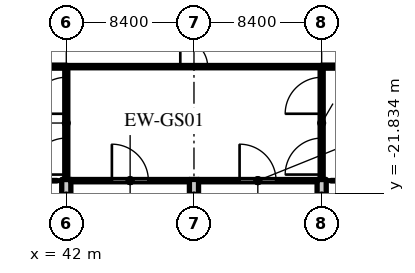
"""IFC4 building model, lengths in metres.
Left out: names, types, materials, properties, quantities, classifications, styles, units other than length and angle.
Written with IfcOpenShell. Run it as: python <this file> out.ifc"""

import sys

from ifc_helpers import new_model, si_unit, direction, frame, frame_2d, origin, place, context, subcontext, project, spatial, rectangle, extrude, source, transform, mapped, element, fill, save


model = new_model("IFC4")
c1 = context("Model", 3, precision=1e-05, world=origin(), true_north=direction((0.0, 1.0)))
c2 = subcontext(c1, "Body", "Model", "MODEL_VIEW")
j1 = project(units=[si_unit("LENGTHUNIT", "METRE"), si_unit("PLANEANGLEUNIT", "RADIAN")], contexts=[c1])
p1 = place(None, origin())
s1 = spatial("IfcSite", under=j1, at=p1, CompositionType="ELEMENT")
p2 = place(p1, origin())
s2 = spatial("IfcBuilding", under=s1, at=p2, CompositionType="ELEMENT")
p3 = place(p2, origin())
s3 = spatial("IfcBuildingStorey", under=s2, at=p3, CompositionType="ELEMENT", Elevation=0.0)
m1 = source(origin(), c2, "Body", "SweptSolid", [
    extrude(rectangle(XDim=2.18, YDim=0.6, at=frame_2d((1.09, 0.0))), origin(), (0.0, 0.0, 1.0), 4.05),
])
for number, where, z_axis, x_axis in (
    (1, (42.0, -23.1, 0.0), (0.0, 0.0, 1.0), (0.0, 1.0, 0.0)),
    (2, (50.4, -23.1, 0.0), (0.0, 0.0, 1.0), (0.0, 1.0, 0.0)),
    (3, (58.8, -23.1, 0.0), (0.0, 0.0, 1.0), (0.0, 1.0, 0.0)),
):
    element("IfcWall", number, at=place(p3, frame(where, z_axis=z_axis, x_axis=x_axis)), inside=s3, PredefinedType="SOLIDWALL", context=c2, shape_type="MappedRepresentation", body=[
        mapped(m1, transform((0.0, 0.0, 0.0), scale=1.0)),
    ])
m2 = source(origin(), c2, "Body", "SweptSolid", [
    extrude(rectangle(XDim=7.8, YDim=0.15, at=frame_2d((3.9, 0.0))), origin(), (0.0, 0.0, 1.0), 4.05),
])
p4 = place(p3, frame((42.3, -21.0, 0.0), z_axis=(0.0, 0.0, 1.0), x_axis=(1.0, 0.0, 0.0)))
e4 = element("IfcWall", 4, at=p4, inside=s3, PredefinedType="SOLIDWALL", context=c2, shape_type="MappedRepresentation", body=[
    mapped(m2, transform((0.0, 0.0, 0.0), scale=1.0)),
])
m3 = source(origin(), c2, "Body", "SweptSolid", [
    extrude(rectangle(XDim=2.4, YDim=2.8, at=frame_2d((1.2, 1.4))), frame((0.0, 0.085, 0.0), z_axis=(0.0, -1.0, 0.0), x_axis=(1.0, 0.0, 0.0)), (0.0, 0.0, 1.0), 0.17),
])
p5 = place(p4, frame((2.7, 0.0, 0.0)))
e5 = element("IfcOpeningElement", 5, at=p5, cuts=e4, PredefinedType="OPENING", context=c2, shape_type="MappedRepresentation", body=[
    mapped(m3, transform((0.0, 0.0, 0.0), scale=1.0)),
])
m4 = source(origin(), c2, "Body", "SweptSolid", [
    extrude(rectangle(XDim=2.4, YDim=3.0, at=frame_2d((1.2, 1.5))), frame((0.0, 0.085, 0.0), z_axis=(0.0, -1.0, 0.0), x_axis=(1.0, 0.0, 0.0)), (0.0, 0.0, 1.0), 0.17),
])
p6 = place(p4, frame((0.15, 0.0, 0.2)))
e6 = element("IfcOpeningElement", 6, at=p6, cuts=e4, PredefinedType="OPENING", context=c2, shape_type="MappedRepresentation", body=[
    mapped(m4, transform((0.0, 0.0, 0.0), scale=1.0)),
])
p7 = place(p4, frame((5.25, 0.0, 0.2)))
e7 = element("IfcOpeningElement", 7, at=p7, cuts=e4, PredefinedType="OPENING", context=c2, shape_type="MappedRepresentation", body=[
    mapped(m4, transform((0.0, 0.0, 0.0), scale=1.0)),
])
p8 = place(p3, frame((50.7, -21.0, 0.0), z_axis=(0.0, 0.0, 1.0), x_axis=(1.0, 0.0, 0.0)))
e8 = element("IfcWall", 8, at=p8, inside=s3, PredefinedType="SOLIDWALL", context=c2, shape_type="MappedRepresentation", body=[
    mapped(m2, transform((0.0, 0.0, 0.0), scale=1.0)),
])
p9 = place(p8, frame((2.7, 0.0, 0.0)))
e9 = element("IfcOpeningElement", 9, at=p9, cuts=e8, PredefinedType="OPENING", context=c2, shape_type="MappedRepresentation", body=[
    mapped(m3, transform((0.0, 0.0, 0.0), scale=1.0)),
])
p10 = place(p8, frame((0.15, 0.0, 0.2)))
e10 = element("IfcOpeningElement", 10, at=p10, cuts=e8, PredefinedType="OPENING", context=c2, shape_type="MappedRepresentation", body=[
    mapped(m4, transform((0.0, 0.0, 0.0), scale=1.0)),
])
p11 = place(p8, frame((5.25, 0.0, 0.2)))
e11 = element("IfcOpeningElement", 11, at=p11, cuts=e8, PredefinedType="OPENING", context=c2, shape_type="MappedRepresentation", body=[
    mapped(m4, transform((0.0, 0.0, 0.0), scale=1.0)),
])
m5 = source(origin(), c2, "Body", "SweptSolid", [
    extrude(rectangle(XDim=25.2, YDim=0.2, at=frame_2d((12.6, 0.0))), origin(), (0.0, 0.0, 1.0), 5.72),
])
p12 = place(p3, frame((16.8, -13.5, 0.0), z_axis=(0.0, 0.0, 1.0), x_axis=(1.0, 0.0, 0.0)))
e12 = element("IfcWall", 12, at=p12, inside=s3, PredefinedType="PARTITIONING", context=c2, shape_type="MappedRepresentation", body=[
    mapped(m5, transform((0.0, 0.0, 0.0), scale=1.0)),
])
m6 = source(origin(), c2, "Body", "SweptSolid", [
    extrude(rectangle(XDim=2.4, YDim=2.1, at=frame_2d((1.2, 1.05))), frame((0.0, 0.11, 0.0), z_axis=(0.0, -1.0, 0.0), x_axis=(1.0, 0.0, 0.0)), (0.0, 0.0, 1.0), 0.22),
])
p13 = place(p12, frame((1.2, 0.0, 0.0)))
e13 = element("IfcOpeningElement", 13, at=p13, cuts=e12, PredefinedType="OPENING", context=c2, shape_type="MappedRepresentation", body=[
    mapped(m6, transform((0.0, 0.0, 0.0), scale=1.0)),
])
p14 = place(p12, frame((6.2, 0.0, 0.0)))
e14 = element("IfcOpeningElement", 14, at=p14, cuts=e12, PredefinedType="OPENING", context=c2, shape_type="MappedRepresentation", body=[
    mapped(m6, transform((0.0, 0.0, 0.0), scale=1.0)),
])
p15 = place(p12, frame((11.2, 0.0, 0.0)))
e15 = element("IfcOpeningElement", 15, at=p15, cuts=e12, PredefinedType="OPENING", context=c2, shape_type="MappedRepresentation", body=[
    mapped(m6, transform((0.0, 0.0, 0.0), scale=1.0)),
])
p16 = place(p12, frame((16.2, 0.0, 0.0)))
e16 = element("IfcOpeningElement", 16, at=p16, cuts=e12, PredefinedType="OPENING", context=c2, shape_type="MappedRepresentation", body=[
    mapped(m6, transform((0.0, 0.0, 0.0), scale=1.0)),
])
p17 = place(p12, frame((21.2, 0.0, 0.0)))
e17 = element("IfcOpeningElement", 17, at=p17, cuts=e12, PredefinedType="OPENING", context=c2, shape_type="MappedRepresentation", body=[
    mapped(m6, transform((0.0, 0.0, 0.0), scale=1.0)),
])
p18 = place(p3, frame((58.8, -13.5, 0.0), z_axis=(0.0, 0.0, 1.0), x_axis=(1.0, 0.0, 0.0)))
e18 = element("IfcWall", 18, at=p18, inside=s3, PredefinedType="PARTITIONING", context=c2, shape_type="MappedRepresentation", body=[
    mapped(m5, transform((0.0, 0.0, 0.0), scale=1.0)),
])
p19 = place(p18, frame((1.6, 0.0, 0.0)))
e19 = element("IfcOpeningElement", 19, at=p19, cuts=e18, PredefinedType="OPENING", context=c2, shape_type="MappedRepresentation", body=[
    mapped(m6, transform((0.0, 0.0, 0.0), scale=1.0)),
])
p20 = place(p18, frame((6.6, 0.0, 0.0)))
e20 = element("IfcOpeningElement", 20, at=p20, cuts=e18, PredefinedType="OPENING", context=c2, shape_type="MappedRepresentation", body=[
    mapped(m6, transform((0.0, 0.0, 0.0), scale=1.0)),
])
p21 = place(p18, frame((11.6, 0.0, 0.0)))
e21 = element("IfcOpeningElement", 21, at=p21, cuts=e18, PredefinedType="OPENING", context=c2, shape_type="MappedRepresentation", body=[
    mapped(m6, transform((0.0, 0.0, 0.0), scale=1.0)),
])
p22 = place(p18, frame((16.6, 0.0, 0.0)))
e22 = element("IfcOpeningElement", 22, at=p22, cuts=e18, PredefinedType="OPENING", context=c2, shape_type="MappedRepresentation", body=[
    mapped(m6, transform((0.0, 0.0, 0.0), scale=1.0)),
])
p23 = place(p18, frame((21.6, 0.0, 0.0)))
e23 = element("IfcOpeningElement", 23, at=p23, cuts=e18, PredefinedType="OPENING", context=c2, shape_type="MappedRepresentation", body=[
    mapped(m6, transform((0.0, 0.0, 0.0), scale=1.0)),
])
m7 = source(origin(), c2, "Body", "SweptSolid", [
    extrude(rectangle(XDim=7.42, YDim=0.2, at=frame_2d((3.71, 0.0))), origin(), (0.0, 0.0, 1.0), 4.12),
])
p24 = place(p3, frame((42.0, -20.92, 0.0), z_axis=(0.0, 0.0, 1.0), x_axis=(0.0, 1.0, 0.0)))
e24 = element("IfcWall", 24, at=p24, inside=s3, PredefinedType="PARTITIONING", context=c2, shape_type="MappedRepresentation", body=[
    mapped(m7, transform((0.0, 0.0, 0.0), scale=1.0)),
])
p25 = place(p24, frame((0.32, 0.0, 0.0)))
e25 = element("IfcOpeningElement", 25, at=p25, cuts=e24, PredefinedType="OPENING", context=c2, shape_type="MappedRepresentation", body=[
    mapped(m6, transform((0.0, 0.0, 0.0), scale=1.0)),
])
p26 = place(p24, frame((4.32, 0.0, 0.0)))
e26 = element("IfcOpeningElement", 26, at=p26, cuts=e24, PredefinedType="OPENING", context=c2, shape_type="MappedRepresentation", body=[
    mapped(m6, transform((0.0, 0.0, 0.0), scale=1.0)),
])
p27 = place(p3, frame((58.8, -20.92, 0.0), z_axis=(0.0, 0.0, 1.0), x_axis=(0.0, 1.0, 0.0)))
e27 = element("IfcWall", 27, at=p27, inside=s3, PredefinedType="PARTITIONING", context=c2, shape_type="MappedRepresentation", body=[
    mapped(m7, transform((0.0, 0.0, 0.0), scale=1.0)),
])
p28 = place(p27, frame((0.32, 0.0, 0.0)))
e28 = element("IfcOpeningElement", 28, at=p28, cuts=e27, PredefinedType="OPENING", context=c2, shape_type="MappedRepresentation", body=[
    mapped(m6, transform((0.0, 0.0, 0.0), scale=1.0)),
])
p29 = place(p27, frame((4.32, 0.0, 0.0)))
e29 = element("IfcOpeningElement", 29, at=p29, cuts=e27, PredefinedType="OPENING", context=c2, shape_type="MappedRepresentation", body=[
    mapped(m6, transform((0.0, 0.0, 0.0), scale=1.0)),
])
m8 = source(origin(), c2, "Body", "SweptSolid", [
    extrude(rectangle(XDim=16.8, YDim=0.15, at=frame_2d((8.4, 0.0))), origin(), (0.0, 0.0, 1.0), 5.72),
])
p30 = place(p3, frame((42.0, -13.5, 0.0), z_axis=(0.0, 0.0, 1.0), x_axis=(1.0, 0.0, 0.0)))
e30 = element("IfcWall", 30, at=p30, inside=s3, PredefinedType="PARTITIONING", context=c2, shape_type="MappedRepresentation", body=[
    mapped(m8, transform((0.0, 0.0, 0.0), scale=1.0)),
])
m9 = source(origin(), c2, "Body", "SweptSolid", [
    extrude(rectangle(XDim=1.8, YDim=2.1, at=frame_2d((0.9, 1.05))), frame((0.0, 0.085, 0.0), z_axis=(0.0, -1.0, 0.0), x_axis=(1.0, 0.0, 0.0)), (0.0, 0.0, 1.0), 0.17),
])
p31 = place(p30, frame((7.5, 0.0, 0.0)))
e31 = element("IfcOpeningElement", 31, at=p31, cuts=e30, PredefinedType="OPENING", context=c2, shape_type="MappedRepresentation", body=[
    mapped(m9, transform((0.0, 0.0, 0.0), scale=1.0)),
])
m10 = source(origin(), c2, "Body", "SweptSolid", [
    extrude(rectangle(XDim=2.4, YDim=2.8, at=frame_2d((1.2, 1.4))), frame((0.0, 0.025, 0.0), z_axis=(0.0, -1.0, 0.0), x_axis=(1.0, 0.0, 0.0)), (0.0, 0.0, 1.0), 0.05),
])
p32 = place(p5, origin())
e32 = element("IfcDoor", 32, at=p32, inside=s3, OperationType="DOUBLE_DOOR_SINGLE_SWING", PredefinedType="DOOR", context=c2, shape_type="MappedRepresentation", body=[
    mapped(m10, transform((0.0, 0.0, 0.0), scale=1.0)),
])
fill(e5, e32)
m11 = source(origin(), c2, "Body", "SweptSolid", [
    extrude(rectangle(XDim=2.4, YDim=3.0, at=frame_2d((1.2, 1.5))), frame((0.0, 0.03, 0.0), z_axis=(0.0, -1.0, 0.0), x_axis=(1.0, 0.0, 0.0)), (0.0, 0.0, 1.0), 0.06),
])
p33 = place(p6, origin())
e33 = element("IfcWindow", 33, at=p33, inside=s3, PartitioningType="SINGLE_PANEL", PredefinedType="WINDOW", context=c2, shape_type="MappedRepresentation", body=[
    mapped(m11, transform((0.0, 0.0, 0.0), scale=1.0)),
])
fill(e6, e33)
p34 = place(p7, origin())
e34 = element("IfcWindow", 34, at=p34, inside=s3, PartitioningType="SINGLE_PANEL", PredefinedType="WINDOW", context=c2, shape_type="MappedRepresentation", body=[
    mapped(m11, transform((0.0, 0.0, 0.0), scale=1.0)),
])
fill(e7, e34)
p35 = place(p9, origin())
e35 = element("IfcDoor", 35, at=p35, inside=s3, OperationType="DOUBLE_DOOR_SINGLE_SWING", PredefinedType="DOOR", context=c2, shape_type="MappedRepresentation", body=[
    mapped(m10, transform((0.0, 0.0, 0.0), scale=1.0)),
])
fill(e9, e35)
p36 = place(p10, origin())
e36 = element("IfcWindow", 36, at=p36, inside=s3, PartitioningType="SINGLE_PANEL", PredefinedType="WINDOW", context=c2, shape_type="MappedRepresentation", body=[
    mapped(m11, transform((0.0, 0.0, 0.0), scale=1.0)),
])
fill(e10, e36)
p37 = place(p11, origin())
e37 = element("IfcWindow", 37, at=p37, inside=s3, PartitioningType="SINGLE_PANEL", PredefinedType="WINDOW", context=c2, shape_type="MappedRepresentation", body=[
    mapped(m11, transform((0.0, 0.0, 0.0), scale=1.0)),
])
fill(e11, e37)
m12 = source(origin(), c2, "Body", "SweptSolid", [
    extrude(rectangle(XDim=2.4, YDim=2.1, at=frame_2d((1.2, 1.05))), frame((0.0, 0.025, 0.0), z_axis=(0.0, -1.0, 0.0), x_axis=(1.0, 0.0, 0.0)), (0.0, 0.0, 1.0), 0.05),
])
p38 = place(p25, origin())
e38 = element("IfcDoor", 38, at=p38, inside=s3, OperationType="DOUBLE_DOOR_SINGLE_SWING", PredefinedType="DOOR", context=c2, shape_type="MappedRepresentation", body=[
    mapped(m12, transform((0.0, 0.0, 0.0), scale=1.0)),
])
fill(e25, e38)
p39 = place(p26, origin())
e39 = element("IfcDoor", 39, at=p39, inside=s3, OperationType="DOUBLE_DOOR_SINGLE_SWING", PredefinedType="DOOR", context=c2, shape_type="MappedRepresentation", body=[
    mapped(m12, transform((0.0, 0.0, 0.0), scale=1.0)),
])
fill(e26, e39)
p40 = place(p28, origin())
e40 = element("IfcDoor", 40, at=p40, inside=s3, OperationType="DOUBLE_DOOR_SINGLE_SWING", PredefinedType="DOOR", context=c2, shape_type="MappedRepresentation", body=[
    mapped(m12, transform((0.0, 0.0, 0.0), scale=1.0)),
])
fill(e28, e40)
p41 = place(p29, origin())
e41 = element("IfcDoor", 41, at=p41, inside=s3, OperationType="DOUBLE_DOOR_SINGLE_SWING", PredefinedType="DOOR", context=c2, shape_type="MappedRepresentation", body=[
    mapped(m12, transform((0.0, 0.0, 0.0), scale=1.0)),
])
fill(e29, e41)
m13 = source(origin(), c2, "Body", "SweptSolid", [
    extrude(rectangle(XDim=1.8, YDim=2.1, at=frame_2d((0.9, 1.05))), frame((0.0, 0.025, 0.0), z_axis=(0.0, -1.0, 0.0), x_axis=(1.0, 0.0, 0.0)), (0.0, 0.0, 1.0), 0.05),
])
p42 = place(p31, origin())
e42 = element("IfcDoor", 42, at=p42, inside=s3, OperationType="DOUBLE_DOOR_SINGLE_SWING", PredefinedType="DOOR", context=c2, shape_type="MappedRepresentation", body=[
    mapped(m13, transform((0.0, 0.0, 0.0), scale=1.0)),
])
fill(e31, e42)
save(model, sys.argv[1])
